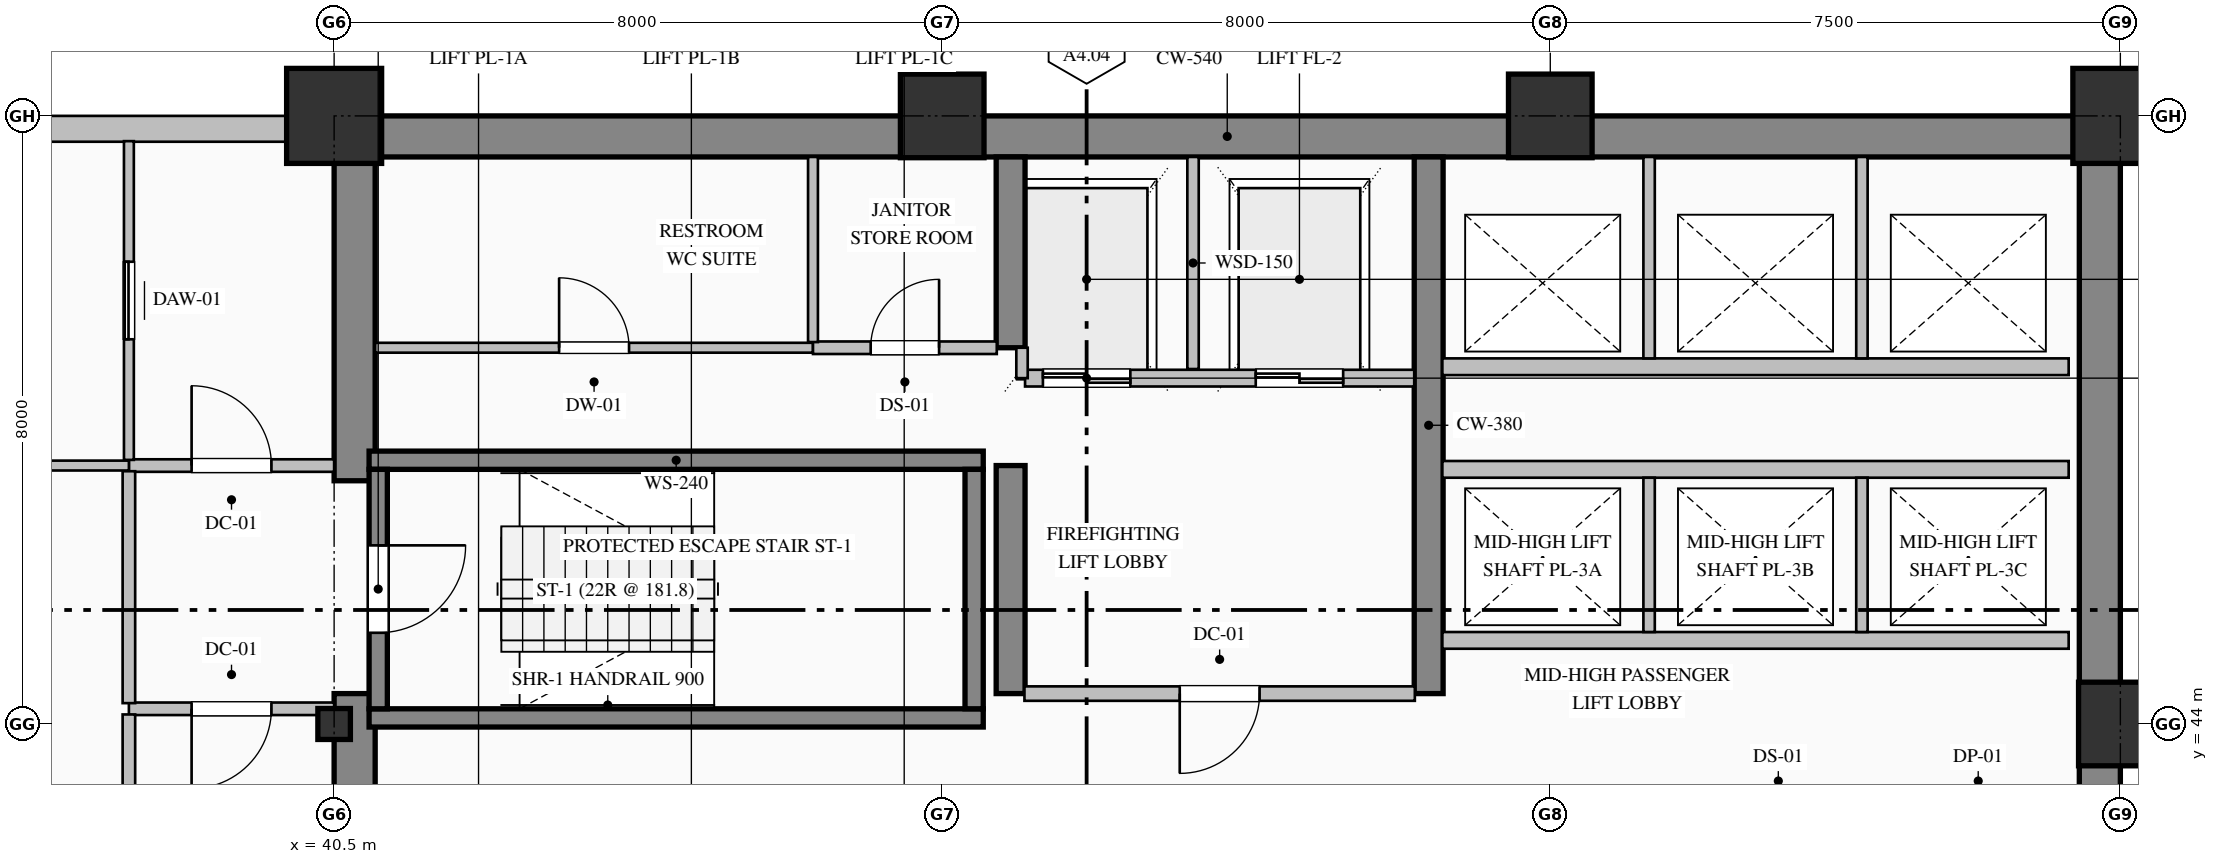
"""IFC4 building model, lengths in metres.
Left out: names, types, materials, properties, quantities, classifications, styles, units other than length and angle.
Written with IfcOpenShell. Run it as: python <this file> out.ifc"""

import sys

from ifc_helpers import new_model, si_unit, direction, frame, frame_2d, origin, origin_2d, place, context, subcontext, project, spatial, rectangle, hollow_rectangle, i_section, extrude, element, fill, save


model = new_model("IFC4")
c1 = context("Model", 3, precision=1e-05, world=origin(), true_north=direction((0.0, 1.0)))
c2 = subcontext(c1, "Body", "Model", "MODEL_VIEW")
j1 = project(units=[si_unit("LENGTHUNIT", "METRE"), si_unit("PLANEANGLEUNIT", "RADIAN")], contexts=[c1])
p1 = place(None, origin())
s1 = spatial("IfcSite", under=j1, at=p1, CompositionType="ELEMENT")
p2 = place(p1, origin())
s2 = spatial("IfcBuilding", under=s1, at=p2, CompositionType="ELEMENT")
p3 = place(p2, frame((0.0, 0.0, 44.2)))
s3 = spatial("IfcBuildingStorey", under=s2, at=p3, CompositionType="ELEMENT", Elevation=44.2)
p4 = place(p3, frame((40.5, 51.73, 0.0), z_axis=(0.0, 0.0, 1.0), x_axis=(1.0, 0.0, 0.0)))
e1 = element("IfcWall", 1, at=p4, inside=s3, PredefinedType="SHEAR", context=c2, shape_type="SweptSolid", body=[
    extrude(rectangle(XDim=23.5, YDim=0.54, at=frame_2d((11.75, 0.0))), origin(), (0.0, 0.0, 1.0), 3.75),
])
p5 = place(p3, frame((63.73, 36.32, 0.0), z_axis=(0.0, 0.0, 1.0), x_axis=(0.0, 1.0, 0.0)))
e2 = element("IfcWall", 2, at=p5, inside=s3, PredefinedType="SHEAR", context=c2, shape_type="SweptSolid", body=[
    extrude(rectangle(XDim=15.14, YDim=0.54, at=frame_2d((7.57, 0.0))), origin(), (0.0, 0.0, 1.0), 3.75),
])
p6 = place(p3, frame((40.77, 36.54, 0.0), z_axis=(0.0, 0.0, 1.0), x_axis=(0.0, 1.0, 0.0)))
e3 = element("IfcWall", 3, at=p6, inside=s3, PredefinedType="SHEAR", context=c2, shape_type="SweptSolid", body=[
    extrude(rectangle(XDim=7.86, YDim=0.54, at=frame_2d((3.93, 0.0))), origin(), (0.0, 0.0, 1.0), 3.75),
])
p7 = place(p3, frame((40.77, 47.2, 0.0), z_axis=(0.0, 0.0, 1.0), x_axis=(0.0, 1.0, 0.0)))
e4 = element("IfcWall", 4, at=p7, inside=s3, PredefinedType="SHEAR", context=c2, shape_type="SweptSolid", body=[
    extrude(rectangle(XDim=4.26, YDim=0.54, at=frame_2d((2.13, 0.0))), origin(), (0.0, 0.0, 1.0), 3.75),
])
p8 = place(p3, frame((49.4, 44.4, 0.0), z_axis=(0.0, 0.0, 1.0), x_axis=(0.0, 1.0, 0.0)))
e5 = element("IfcWall", 5, at=p8, inside=s3, PredefinedType="SHEAR", context=c2, shape_type="SweptSolid", body=[
    extrude(rectangle(XDim=3.0, YDim=0.38, at=frame_2d((1.5, 0.0))), origin(), (0.0, 0.0, 1.0), 3.75),
])
p9 = place(p3, frame((49.4, 48.95, 0.0), z_axis=(0.0, 0.0, 1.0), x_axis=(0.0, 1.0, 0.0)))
e6 = element("IfcWall", 6, at=p9, inside=s3, PredefinedType="SHEAR", context=c2, shape_type="SweptSolid", body=[
    extrude(rectangle(XDim=2.51, YDim=0.38, at=frame_2d((1.255, 0.0))), origin(), (0.0, 0.0, 1.0), 3.75),
])
p10 = place(p3, frame((54.9, 44.4, 0.0), z_axis=(0.0, 0.0, 1.0), x_axis=(0.0, 1.0, 0.0)))
e7 = element("IfcWall", 7, at=p10, inside=s3, PredefinedType="SHEAR", context=c2, shape_type="SweptSolid", body=[
    extrude(rectangle(XDim=7.06, YDim=0.38, at=frame_2d((3.53, 0.0))), origin(), (0.0, 0.0, 1.0), 3.75),
])
p11 = place(p3, frame((40.5, 44.0, 0.0), z_axis=(0.0, 0.0, 1.0), x_axis=(1.0, 0.0, 0.0)))
e8 = element("IfcColumn", 8, at=p11, inside=s3, PredefinedType="COLUMN", context=c2, shape_type="SweptSolid", body=[
    extrude(i_section(OverallWidth=0.407, OverallDepth=0.428, WebThickness=0.02, FlangeThickness=0.035, FilletRadius=0.022, at=origin_2d()), origin(), (0.0, 0.0, 1.0), 4.0),
])
p12 = place(p3, frame((40.5, 52.0, 0.0), z_axis=(0.0, 0.0, 1.0), x_axis=(1.0, 0.0, 0.0)))
e9 = element("IfcColumn", 9, at=p12, inside=s3, PredefinedType="COLUMN", context=c2, shape_type="SweptSolid", body=[
    extrude(hollow_rectangle(XDim=1.25, YDim=1.25, WallThickness=0.045, at=origin_2d()), origin(), (0.0, 0.0, 1.0), 4.0),
])
for number, where, z_axis, x_axis in (
    (10, (48.5, 52.0, 0.0), (0.0, 0.0, 1.0), (1.0, 0.0, 0.0)),
    (11, (56.5, 52.0, 0.0), (0.0, 0.0, 1.0), (1.0, 0.0, 0.0)),
    (12, (64.0, 44.0, 0.0), (0.0, 0.0, 1.0), (1.0, 0.0, 0.0)),
):
    element("IfcColumn", number, at=place(p3, frame(where, z_axis=z_axis, x_axis=x_axis)), inside=s3, PredefinedType="COLUMN", context=c2, shape_type="SweptSolid", body=[
        extrude(hollow_rectangle(XDim=1.1, YDim=1.1, WallThickness=0.04, at=origin_2d()), origin(), (0.0, 0.0, 1.0), 4.0),
    ])
p13 = place(p3, frame((64.0, 52.0, 0.0), z_axis=(0.0, 0.0, 1.0), x_axis=(1.0, 0.0, 0.0)))
e13 = element("IfcColumn", 13, at=p13, inside=s3, PredefinedType="COLUMN", context=c2, shape_type="SweptSolid", body=[
    extrude(hollow_rectangle(XDim=1.25, YDim=1.25, WallThickness=0.045, at=origin_2d()), origin(), (0.0, 0.0, 1.0), 4.0),
])
p14 = place(p3, frame((4.0, 51.83, 0.0), z_axis=(0.0, 0.0, 1.0), x_axis=(1.0, 0.0, 0.0)))
e14 = element("IfcWall", 14, at=p14, inside=s3, PredefinedType="SOLIDWALL", context=c2, shape_type="SweptSolid", body=[
    extrude(rectangle(XDim=36.52, YDim=0.34, at=frame_2d((18.26, 0.0))), origin(), (0.0, 0.0, 1.0), 3.25),
])
p15 = place(p14, frame((6.15, 0.0, 0.85)))
e15 = element("IfcOpeningElement", 15, at=p15, cuts=e14, PredefinedType="OPENING", context=c2, shape_type="SweptSolid", body=[
    extrude(rectangle(XDim=2.1, YDim=2.05, at=frame_2d((1.05, 1.025))), frame((0.0, 0.18, 0.0), z_axis=(0.0, -1.0, 0.0), x_axis=(1.0, 0.0, 0.0)), (0.0, 0.0, 1.0), 0.36),
])
p16 = place(p14, frame((13.5, 0.0, 0.85)))
e16 = element("IfcOpeningElement", 16, at=p16, cuts=e14, PredefinedType="OPENING", context=c2, shape_type="SweptSolid", body=[
    extrude(rectangle(XDim=1.8, YDim=2.05, at=frame_2d((0.9, 1.025))), frame((0.0, 0.18, 0.0), z_axis=(0.0, -1.0, 0.0), x_axis=(1.0, 0.0, 0.0)), (0.0, 0.0, 1.0), 0.36),
])
p17 = place(p14, frame((16.95, 0.0, 0.85)))
e17 = element("IfcOpeningElement", 17, at=p17, cuts=e14, PredefinedType="OPENING", context=c2, shape_type="SweptSolid", body=[
    extrude(rectangle(XDim=2.1, YDim=2.05, at=frame_2d((1.05, 1.025))), frame((0.0, 0.18, 0.0), z_axis=(0.0, -1.0, 0.0), x_axis=(1.0, 0.0, 0.0)), (0.0, 0.0, 1.0), 0.36),
])
p18 = place(p14, frame((24.3, 0.0, 0.85)))
e18 = element("IfcOpeningElement", 18, at=p18, cuts=e14, PredefinedType="OPENING", context=c2, shape_type="SweptSolid", body=[
    extrude(rectangle(XDim=1.8, YDim=2.05, at=frame_2d((0.9, 1.025))), frame((0.0, 0.18, 0.0), z_axis=(0.0, -1.0, 0.0), x_axis=(1.0, 0.0, 0.0)), (0.0, 0.0, 1.0), 0.36),
])
for number, where, z_axis, x_axis in (
    (19, (40.96, 47.47, 0.0), (0.0, 0.0, 1.0), (1.0, 0.0, 0.0)),
    (20, (49.04, 44.08, 0.0), (0.0, 0.0, 1.0), (-1.0, 0.0, 0.0)),
):
    element("IfcWall", number, at=place(p3, frame(where, z_axis=z_axis, x_axis=x_axis)), inside=s3, PredefinedType="SOLIDWALL", context=c2, shape_type="SweptSolid", body=[
        extrude(rectangle(XDim=8.08, YDim=0.24, at=frame_2d((4.04, 0.0))), origin(), (0.0, 0.0, 1.0), 4.0),
    ])
p19 = place(p3, frame((41.08, 47.35, 0.0), z_axis=(0.0, 0.0, 1.0), x_axis=(0.0, -1.0, 0.0)))
e21 = element("IfcWall", 21, at=p19, inside=s3, PredefinedType="SOLIDWALL", context=c2, shape_type="SweptSolid", body=[
    extrude(rectangle(XDim=3.15, YDim=0.24, at=frame_2d((1.575, 0.0))), origin(), (0.0, 0.0, 1.0), 4.0),
])
p20 = place(p19, frame((1.0, 0.0, 0.0)))
e22 = element("IfcOpeningElement", 22, at=p20, cuts=e21, PredefinedType="OPENING", context=c2, shape_type="SweptSolid", body=[
    extrude(rectangle(XDim=1.15, YDim=2.2, at=frame_2d((0.575, 1.1))), frame((0.0, 0.13, 0.0), z_axis=(0.0, -1.0, 0.0), x_axis=(1.0, 0.0, 0.0)), (0.0, 0.0, 1.0), 0.26),
])
p21 = place(p3, frame((48.92, 44.2, 0.0), z_axis=(0.0, 0.0, 1.0), x_axis=(0.0, 1.0, 0.0)))
e23 = element("IfcWall", 23, at=p21, inside=s3, PredefinedType="SOLIDWALL", context=c2, shape_type="SweptSolid", body=[
    extrude(rectangle(XDim=3.15, YDim=0.24, at=frame_2d((1.575, 0.0))), origin(), (0.0, 0.0, 1.0), 4.0),
])
p22 = place(p3, frame((54.71, 48.55, 0.0), z_axis=(0.0, 0.0, 1.0), x_axis=(-1.0, 0.0, 0.0)))
e24 = element("IfcWall", 24, at=p22, inside=s3, PredefinedType="PARTITIONING", context=c2, shape_type="SweptSolid", body=[
    extrude(rectangle(XDim=5.12, YDim=0.22, at=frame_2d((2.56, 0.0))), origin(), (0.0, 0.0, 1.0), 3.75),
])
p23 = place(p22, frame((3.735, 0.0, 0.0)))
e25 = element("IfcOpeningElement", 25, at=p23, cuts=e24, PredefinedType="OPENING", context=c2, shape_type="SweptSolid", body=[
    extrude(rectangle(XDim=1.15, YDim=2.2, at=frame_2d((0.575, 1.1))), frame((0.0, 0.12, 0.0), z_axis=(0.0, -1.0, 0.0), x_axis=(1.0, 0.0, 0.0)), (0.0, 0.0, 1.0), 0.24),
])
p24 = place(p22, frame((0.935, 0.0, 0.0)))
e26 = element("IfcOpeningElement", 26, at=p24, cuts=e24, PredefinedType="OPENING", context=c2, shape_type="SweptSolid", body=[
    extrude(rectangle(XDim=1.15, YDim=2.2, at=frame_2d((0.575, 1.1))), frame((0.0, 0.12, 0.0), z_axis=(0.0, -1.0, 0.0), x_axis=(1.0, 0.0, 0.0)), (0.0, 0.0, 1.0), 0.24),
])
p25 = place(p3, frame((51.8, 48.67, 0.0), z_axis=(0.0, 0.0, 1.0), x_axis=(0.0, 1.0, 0.0)))
e27 = element("IfcWall", 27, at=p25, inside=s3, PredefinedType="PARTITIONING", context=c2, shape_type="SweptSolid", body=[
    extrude(rectangle(XDim=2.79, YDim=0.15, at=frame_2d((1.395, 0.0))), origin(), (0.0, 0.0, 1.0), 3.75),
])
p26 = place(p3, frame((49.55, 48.55, 0.0), z_axis=(0.0, 0.0, 1.0), x_axis=(0.0, 1.0, 0.0)))
e28 = element("IfcWall", 28, at=p26, inside=s3, PredefinedType="PARTITIONING", context=c2, shape_type="SweptSolid", body=[
    extrude(rectangle(XDim=0.4, YDim=0.15, at=frame_2d((0.2, 0.0))), origin(), (0.0, 0.0, 1.0), 3.75),
])
for number, where, z_axis, x_axis in (
    (29, (63.32, 45.1, 0.0), (0.0, 0.0, 1.0), (-1.0, 0.0, 0.0)),
    (30, (55.08, 47.35, 0.0), (0.0, 0.0, 1.0), (1.0, 0.0, 0.0)),
):
    element("IfcWall", number, at=place(p3, frame(where, z_axis=z_axis, x_axis=x_axis)), inside=s3, PredefinedType="PARTITIONING", context=c2, shape_type="SweptSolid", body=[
        extrude(rectangle(XDim=8.24, YDim=0.22, at=frame_2d((4.12, 0.0))), origin(), (0.0, 0.0, 1.0), 3.75),
    ])
for number, where, z_axis, x_axis in (
    (31, (57.8, 45.21, 0.0), (0.0, 0.0, 1.0), (0.0, 1.0, 0.0)),
    (32, (60.6, 45.21, 0.0), (0.0, 0.0, 1.0), (0.0, 1.0, 0.0)),
):
    element("IfcWall", number, at=place(p3, frame(where, z_axis=z_axis, x_axis=x_axis)), inside=s3, PredefinedType="PARTITIONING", context=c2, shape_type="SweptSolid", body=[
        extrude(rectangle(XDim=2.03, YDim=0.15, at=frame_2d((1.015, 0.0))), origin(), (0.0, 0.0, 1.0), 3.75),
    ])
p27 = place(p3, frame((63.32, 48.7, 0.0), z_axis=(0.0, 0.0, 1.0), x_axis=(-1.0, 0.0, 0.0)))
e33 = element("IfcWall", 33, at=p27, inside=s3, PredefinedType="PARTITIONING", context=c2, shape_type="SweptSolid", body=[
    extrude(rectangle(XDim=8.24, YDim=0.22, at=frame_2d((4.12, 0.0))), origin(), (0.0, 0.0, 1.0), 3.75),
])
for number, where, z_axis, x_axis in (
    (34, (57.8, 48.81, 0.0), (0.0, 0.0, 1.0), (0.0, 1.0, 0.0)),
    (35, (60.6, 48.81, 0.0), (0.0, 0.0, 1.0), (0.0, 1.0, 0.0)),
):
    element("IfcWall", number, at=place(p3, frame(where, z_axis=z_axis, x_axis=x_axis)), inside=s3, PredefinedType="PARTITIONING", context=c2, shape_type="SweptSolid", body=[
        extrude(rectangle(XDim=2.65, YDim=0.15, at=frame_2d((1.325, 0.0))), origin(), (0.0, 0.0, 1.0), 3.75),
    ])
p28 = place(p3, frame((37.8, 47.4, 0.0), z_axis=(0.0, 0.0, 1.0), x_axis=(1.0, 0.0, 0.0)))
e36 = element("IfcWall", 36, at=p28, inside=s3, PredefinedType="PARTITIONING", context=c2, shape_type="SweptSolid", body=[
    extrude(rectangle(XDim=2.7, YDim=0.165, at=frame_2d((1.35, 0.0))), origin(), (0.0, 0.0, 1.0), 3.75),
])
p29 = place(p28, frame((0.825, 0.0, 0.0)))
e37 = element("IfcOpeningElement", 37, at=p29, cuts=e36, PredefinedType="OPENING", context=c2, shape_type="SweptSolid", body=[
    extrude(rectangle(XDim=1.05, YDim=2.15, at=frame_2d((0.525, 1.075))), frame((0.0, 0.093, 0.0), z_axis=(0.0, -1.0, 0.0), x_axis=(1.0, 0.0, 0.0)), (0.0, 0.0, 1.0), 0.185),
])
p30 = place(p3, frame((40.5, 44.2, 0.0), z_axis=(0.0, 0.0, 1.0), x_axis=(-1.0, 0.0, 0.0)))
e38 = element("IfcWall", 38, at=p30, inside=s3, PredefinedType="PARTITIONING", context=c2, shape_type="SweptSolid", body=[
    extrude(rectangle(XDim=2.7, YDim=0.165, at=frame_2d((1.35, 0.0))), origin(), (0.0, 0.0, 1.0), 3.75),
])
p31 = place(p30, frame((0.825, 0.0, 0.0)))
e39 = element("IfcOpeningElement", 39, at=p31, cuts=e38, PredefinedType="OPENING", context=c2, shape_type="SweptSolid", body=[
    extrude(rectangle(XDim=1.05, YDim=2.15, at=frame_2d((0.525, 1.075))), frame((0.0, 0.093, 0.0), z_axis=(0.0, -1.0, 0.0), x_axis=(1.0, 0.0, 0.0)), (0.0, 0.0, 1.0), 0.185),
])
p32 = place(p3, frame((37.8, 44.274, 0.0), z_axis=(0.0, 0.0, 1.0), x_axis=(0.0, 1.0, 0.0)))
e40 = element("IfcWall", 40, at=p32, inside=s3, PredefinedType="PARTITIONING", context=c2, shape_type="SweptSolid", body=[
    extrude(rectangle(XDim=3.051, YDim=0.165, at=frame_2d((1.525, 0.0))), origin(), (0.0, 0.0, 1.0), 3.75),
])
p33 = place(p3, frame((37.8, 47.475, 0.0), z_axis=(0.0, 0.0, 1.0), x_axis=(0.0, 1.0, 0.0)))
e41 = element("IfcWall", 41, at=p33, inside=s3, PredefinedType="PARTITIONING", context=c2, shape_type="SweptSolid", body=[
    extrude(rectangle(XDim=4.193, YDim=0.13, at=frame_2d((2.097, 0.0))), origin(), (0.0, 0.0, 1.0), 3.75),
])
p34 = place(p33, frame((1.587, 0.0, 0.0)))
e42 = element("IfcOpeningElement", 42, at=p34, cuts=e41, PredefinedType="OPENING", context=c2, shape_type="SweptSolid", body=[
    extrude(rectangle(XDim=1.02, YDim=2.15, at=frame_2d((0.51, 1.075))), frame((0.0, 0.075, 0.0), z_axis=(0.0, -1.0, 0.0), x_axis=(1.0, 0.0, 0.0)), (0.0, 0.0, 1.0), 0.15),
])
p35 = place(p3, frame((37.8, 47.4, 0.0), z_axis=(0.0, 0.0, 1.0), x_axis=(-1.0, 0.0, 0.0)))
e43 = element("IfcWall", 43, at=p35, inside=s3, PredefinedType="PARTITIONING", context=c2, shape_type="SweptSolid", body=[
    extrude(rectangle(XDim=2.4, YDim=0.13, at=frame_2d((1.2, 0.0))), origin(), (0.0, 0.0, 1.0), 3.75),
])
p36 = place(p3, frame((41.04, 48.95, 0.0), z_axis=(0.0, 0.0, 1.0), x_axis=(1.0, 0.0, 0.0)))
e44 = element("IfcWall", 44, at=p36, inside=s3, PredefinedType="PARTITIONING", context=c2, shape_type="SweptSolid", body=[
    extrude(rectangle(XDim=5.76, YDim=0.13, at=frame_2d((2.88, 0.0))), origin(), (0.0, 0.0, 1.0), 3.75),
])
p37 = place(p36, frame((2.42, 0.0, 0.0)))
e45 = element("IfcOpeningElement", 45, at=p37, cuts=e44, PredefinedType="OPENING", context=c2, shape_type="SweptSolid", body=[
    extrude(rectangle(XDim=0.92, YDim=2.15, at=frame_2d((0.46, 1.075))), frame((0.0, 0.075, 0.0), z_axis=(0.0, -1.0, 0.0), x_axis=(1.0, 0.0, 0.0)), (0.0, 0.0, 1.0), 0.15),
])
p38 = place(p3, frame((46.8, 48.95, 0.0), z_axis=(0.0, 0.0, 1.0), x_axis=(1.0, 0.0, 0.0)))
e46 = element("IfcWall", 46, at=p38, inside=s3, PredefinedType="PARTITIONING", context=c2, shape_type="SweptSolid", body=[
    extrude(rectangle(XDim=2.418, YDim=0.165, at=frame_2d((1.209, 0.0))), origin(), (0.0, 0.0, 1.0), 3.75),
])
p39 = place(p38, frame((0.759, 0.0, 0.0)))
e47 = element("IfcOpeningElement", 47, at=p39, cuts=e46, PredefinedType="OPENING", context=c2, shape_type="SweptSolid", body=[
    extrude(rectangle(XDim=0.9, YDim=2.15, at=frame_2d((0.45, 1.075))), frame((0.0, 0.093, 0.0), z_axis=(0.0, -1.0, 0.0), x_axis=(1.0, 0.0, 0.0)), (0.0, 0.0, 1.0), 0.185),
])
p40 = place(p3, frame((54.718, 44.4, 0.0), z_axis=(0.0, 0.0, 1.0), x_axis=(-1.0, 0.0, 0.0)))
e48 = element("IfcWall", 48, at=p40, inside=s3, PredefinedType="PARTITIONING", context=c2, shape_type="SweptSolid", body=[
    extrude(rectangle(XDim=5.136, YDim=0.19, at=frame_2d((2.568, 0.0))), origin(), (0.0, 0.0, 1.0), 3.75),
])
p41 = place(p40, frame((2.043, 0.0, 0.0)))
e49 = element("IfcOpeningElement", 49, at=p41, cuts=e48, PredefinedType="OPENING", context=c2, shape_type="SweptSolid", body=[
    extrude(rectangle(XDim=1.05, YDim=2.15, at=frame_2d((0.525, 1.075))), frame((0.0, 0.105, 0.0), z_axis=(0.0, -1.0, 0.0), x_axis=(1.0, 0.0, 0.0)), (0.0, 0.0, 1.0), 0.21),
])
p42 = place(p3, frame((46.8, 51.46, 0.0), z_axis=(0.0, 0.0, 1.0), x_axis=(0.0, -1.0, 0.0)))
e50 = element("IfcWall", 50, at=p42, inside=s3, PredefinedType="PARTITIONING", context=c2, shape_type="SweptSolid", body=[
    extrude(rectangle(XDim=2.436, YDim=0.13, at=frame_2d((1.218, 0.0))), origin(), (0.0, 0.0, 1.0), 3.75),
])
p43 = place(p3, frame((37.8, 40.475, 0.0), z_axis=(0.0, 0.0, 1.0), x_axis=(0.0, 1.0, 0.0)))
e51 = element("IfcWall", 51, at=p43, inside=s3, PredefinedType="PARTITIONING", context=c2, shape_type="SweptSolid", body=[
    extrude(rectangle(XDim=3.651, YDim=0.165, at=frame_2d((1.825, 0.0))), origin(), (0.0, 0.0, 1.0), 3.75),
])
p44 = place(p20, origin())
e52 = element("IfcDoor", 52, at=p44, inside=s3, OperationType="SINGLE_SWING_LEFT", PredefinedType="DOOR", context=c2, shape_type="SweptSolid", body=[
    extrude(rectangle(XDim=1.15, YDim=2.2, at=frame_2d((0.575, 1.1))), frame((0.0, 0.025, 0.0), z_axis=(0.0, -1.0, 0.0), x_axis=(1.0, 0.0, 0.0)), (0.0, 0.0, 1.0), 0.05),
])
fill(e22, e52)
p45 = place(p23, origin())
e53 = element("IfcDoor", 53, at=p45, inside=s3, OperationType="DOUBLE_DOOR_SLIDING", PredefinedType="DOOR", context=c2, shape_type="SweptSolid", body=[
    extrude(rectangle(XDim=1.15, YDim=2.2, at=frame_2d((0.575, 1.1))), frame((0.0, 0.025, 0.0), z_axis=(0.0, -1.0, 0.0), x_axis=(1.0, 0.0, 0.0)), (0.0, 0.0, 1.0), 0.05),
])
fill(e25, e53)
p46 = place(p24, origin())
e54 = element("IfcDoor", 54, at=p46, inside=s3, OperationType="DOUBLE_DOOR_SLIDING", PredefinedType="DOOR", context=c2, shape_type="SweptSolid", body=[
    extrude(rectangle(XDim=1.15, YDim=2.2, at=frame_2d((0.575, 1.1))), frame((0.0, 0.025, 0.0), z_axis=(0.0, -1.0, 0.0), x_axis=(1.0, 0.0, 0.0)), (0.0, 0.0, 1.0), 0.05),
])
fill(e26, e54)
p47 = place(p41, origin())
e55 = element("IfcDoor", 55, at=p47, inside=s3, OperationType="SINGLE_SWING_RIGHT", PredefinedType="DOOR", context=c2, shape_type="SweptSolid", body=[
    extrude(rectangle(XDim=1.05, YDim=2.15, at=frame_2d((0.525, 1.075))), frame((0.0, 0.025, 0.0), z_axis=(0.0, -1.0, 0.0), x_axis=(1.0, 0.0, 0.0)), (0.0, 0.0, 1.0), 0.05),
])
fill(e49, e55)
p48 = place(p29, origin())
e56 = element("IfcDoor", 56, at=p48, inside=s3, OperationType="SINGLE_SWING_LEFT", PredefinedType="DOOR", context=c2, shape_type="SweptSolid", body=[
    extrude(rectangle(XDim=1.05, YDim=2.15, at=frame_2d((0.525, 1.075))), frame((0.0, 0.025, 0.0), z_axis=(0.0, -1.0, 0.0), x_axis=(1.0, 0.0, 0.0)), (0.0, 0.0, 1.0), 0.05),
])
fill(e37, e56)
p49 = place(p31, origin())
e57 = element("IfcDoor", 57, at=p49, inside=s3, OperationType="SINGLE_SWING_RIGHT", PredefinedType="DOOR", context=c2, shape_type="SweptSolid", body=[
    extrude(rectangle(XDim=1.05, YDim=2.15, at=frame_2d((0.525, 1.075))), frame((0.0, 0.025, 0.0), z_axis=(0.0, -1.0, 0.0), x_axis=(1.0, 0.0, 0.0)), (0.0, 0.0, 1.0), 0.05),
])
fill(e39, e57)
p50 = place(p34, origin())
e58 = element("IfcDoor", 58, at=p50, inside=s3, OperationType="SLIDING_TO_LEFT", PredefinedType="DOOR", context=c2, shape_type="SweptSolid", body=[
    extrude(rectangle(XDim=1.02, YDim=2.15, at=frame_2d((0.51, 1.075))), frame((0.0, 0.025, 0.0), z_axis=(0.0, -1.0, 0.0), x_axis=(1.0, 0.0, 0.0)), (0.0, 0.0, 1.0), 0.05),
])
fill(e42, e58)
p51 = place(p37, origin())
e59 = element("IfcDoor", 59, at=p51, inside=s3, OperationType="SINGLE_SWING_LEFT", PredefinedType="DOOR", context=c2, shape_type="SweptSolid", body=[
    extrude(rectangle(XDim=0.92, YDim=2.15, at=frame_2d((0.46, 1.075))), frame((0.0, 0.025, 0.0), z_axis=(0.0, -1.0, 0.0), x_axis=(1.0, 0.0, 0.0)), (0.0, 0.0, 1.0), 0.05),
])
fill(e45, e59)
p52 = place(p39, origin())
e60 = element("IfcDoor", 60, at=p52, inside=s3, OperationType="SINGLE_SWING_RIGHT", PredefinedType="DOOR", context=c2, shape_type="SweptSolid", body=[
    extrude(rectangle(XDim=0.9, YDim=2.15, at=frame_2d((0.45, 1.075))), frame((0.0, 0.025, 0.0), z_axis=(0.0, -1.0, 0.0), x_axis=(1.0, 0.0, 0.0)), (0.0, 0.0, 1.0), 0.05),
])
fill(e47, e60)
save(model, sys.argv[1])
